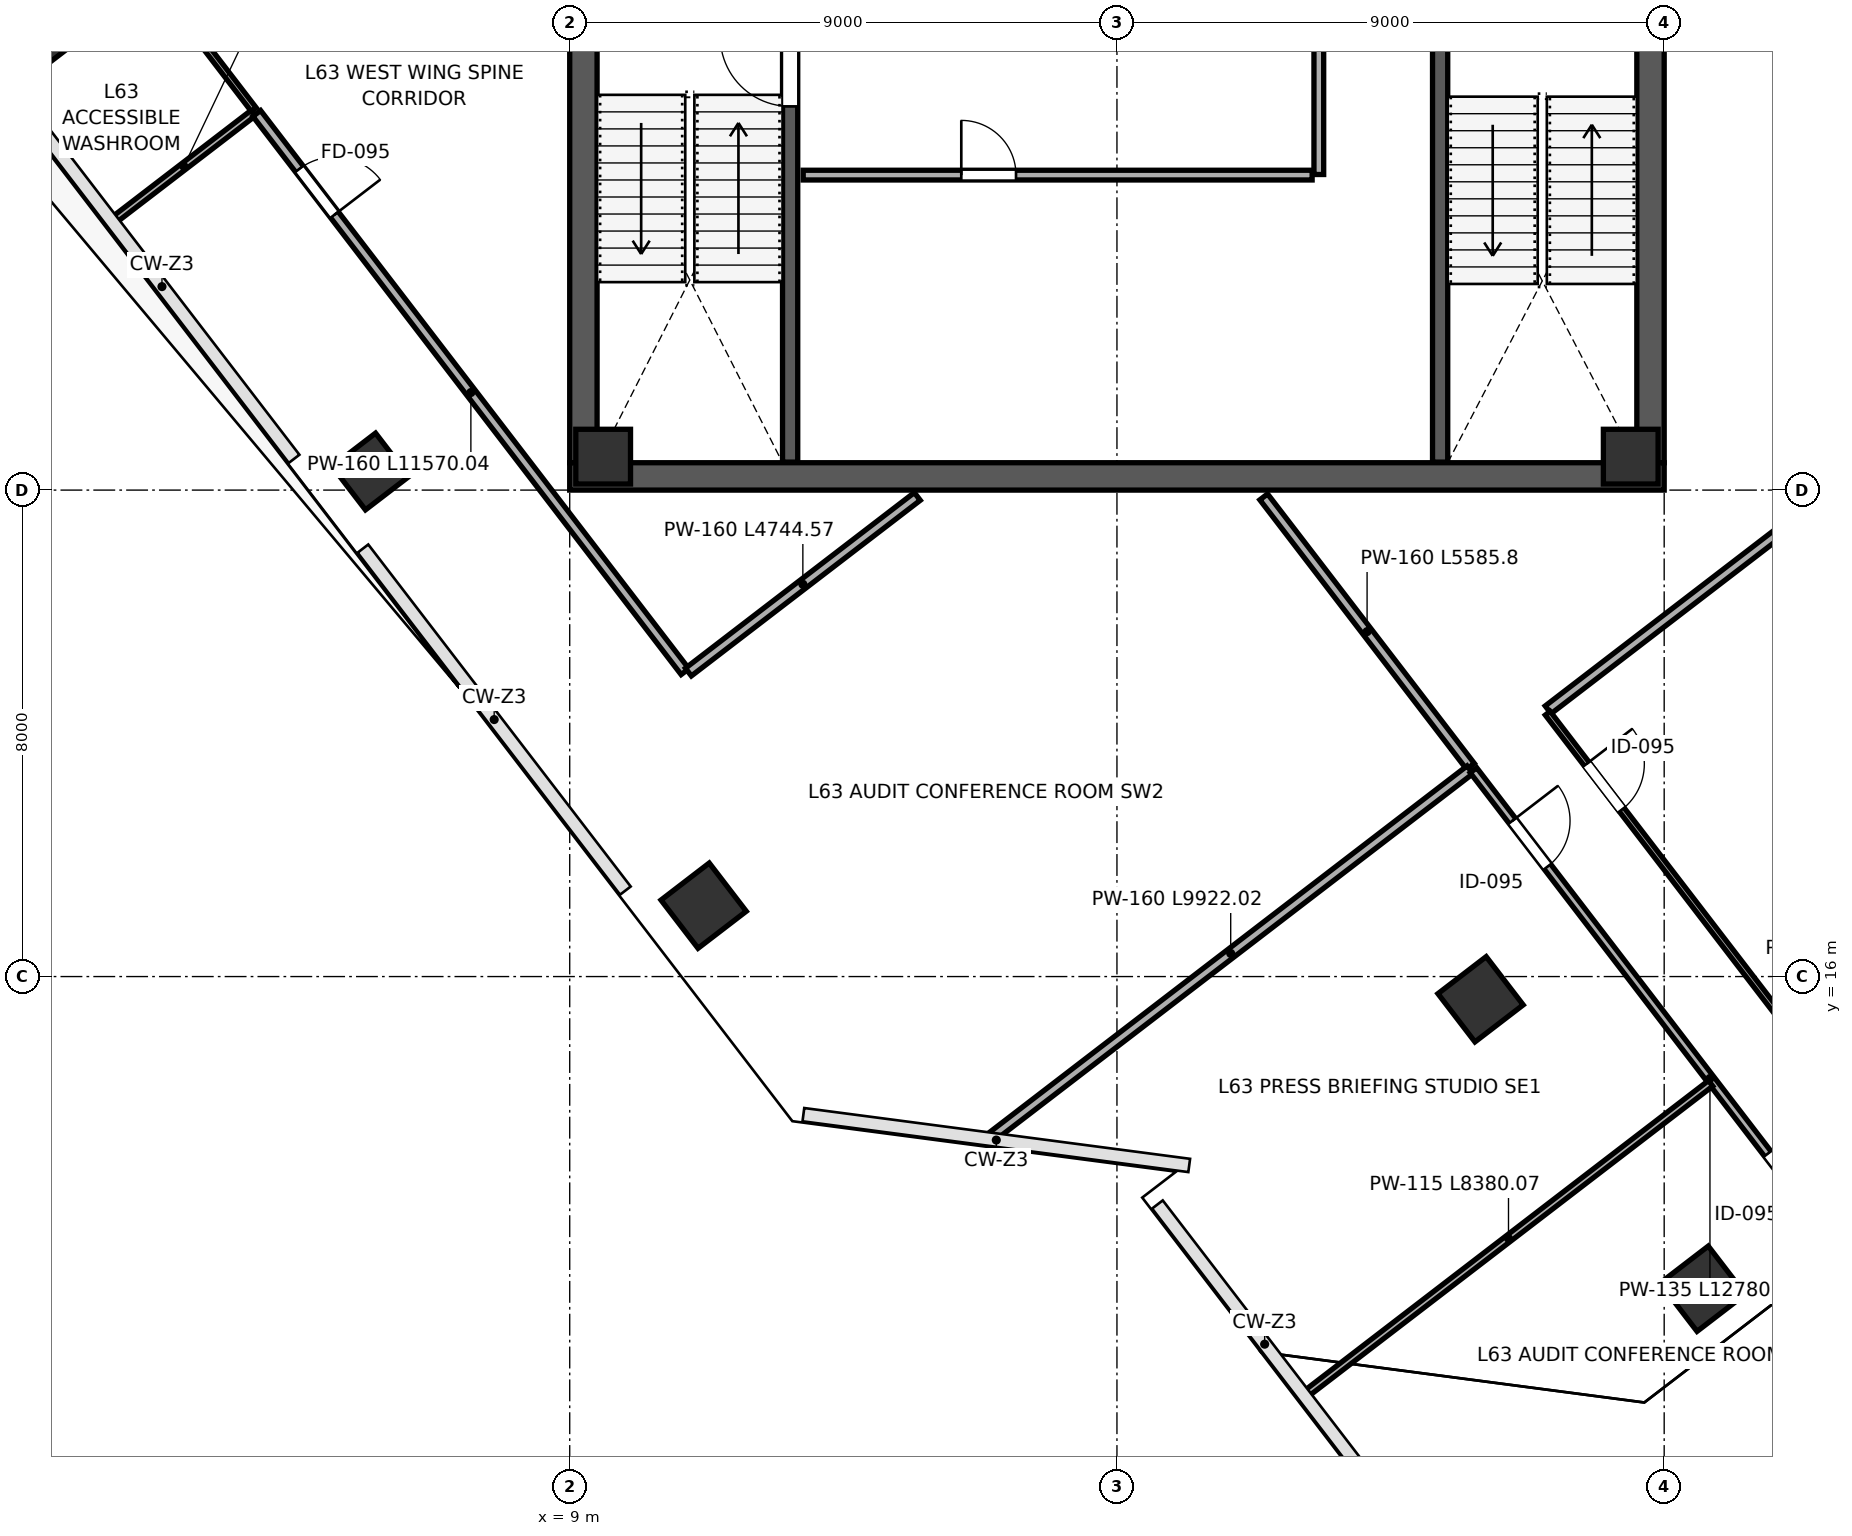
"""IFC4 building model, lengths in metres.
Left out: names, types, materials, properties, quantities, classifications, styles, units other than length and angle.
Written with IfcOpenShell. Run it as: python <this file> out.ifc"""

import sys

from ifc_helpers import new_model, si_unit, direction, frame, frame_2d, origin, origin_2d, place, context, subcontext, project, spatial, rectangle, extrude, source, transform, mapped, element, fill, save


model = new_model("IFC4")
c1 = context("Model", 3, precision=1e-05, world=origin(), true_north=direction((0.0, 1.0)))
c2 = subcontext(c1, "Body", "Model", "MODEL_VIEW")
j1 = project(units=[si_unit("LENGTHUNIT", "METRE"), si_unit("PLANEANGLEUNIT", "RADIAN")], contexts=[c1])
p1 = place(None, origin())
s1 = spatial("IfcSite", under=j1, at=p1, CompositionType="ELEMENT")
p2 = place(p1, origin())
s2 = spatial("IfcBuilding", under=s1, at=p2, CompositionType="ELEMENT")
p3 = place(p2, frame((0.0, 0.0, 279.4)))
s3 = spatial("IfcBuildingStorey", under=s2, at=p3, CompositionType="ELEMENT", Elevation=279.4)
m1 = source(origin(), c2, "Body", "SweptSolid", [
    extrude(rectangle(XDim=0.9, YDim=0.9, at=origin_2d()), origin(), (0.0, 0.0, 1.0), 4.199),
])
for number, where, z_axis, x_axis in (
    (1, (9.55, 24.55, 0.001), (0.0, 0.0, 1.0), (1.0, 0.0, 0.0)),
    (2, (26.45, 24.55, 0.001), (0.0, 0.0, 1.0), (1.0, 0.0, 0.0)),
):
    element("IfcColumn", number, at=place(p3, frame(where, z_axis=z_axis, x_axis=x_axis)), inside=s3, PredefinedType="COLUMN", context=c2, shape_type="MappedRepresentation", body=[
        mapped(m1, transform((0.0, 0.0, 0.0), scale=1.0)),
    ])
m2 = source(origin(), c2, "Body", "SweptSolid", [
    extrude(rectangle(XDim=0.9, YDim=0.9, at=origin_2d()), origin(), (0.0, 0.0, 1.0), 4.199),
])
for number, where, z_axis, x_axis in (
    (3, (0.245, 31.446, 0.001), (0.0, 0.0, 1.0), (-0.609, 0.793, 0.0)),
    (4, (5.724, 24.306, 0.001), (0.0, 0.0, 1.0), (-0.609, 0.793, 0.0)),
):
    element("IfcColumn", number, at=place(p3, frame(where, z_axis=z_axis, x_axis=x_axis)), inside=s3, PredefinedType="COLUMN", context=c2, shape_type="MappedRepresentation", body=[
        mapped(m2, transform((0.0, 0.0, 0.0), scale=1.0)),
    ])
m3 = source(origin(), c2, "Body", "SweptSolid", [
    extrude(rectangle(XDim=1.0, YDim=1.0, at=origin_2d()), origin(), (0.0, 0.0, 1.0), 4.199),
])
p4 = place(p3, frame((11.202, 17.166, 0.001), z_axis=(0.0, 0.0, 1.0), x_axis=(-0.608761429009, 0.793353340291, 0.0)))
e5 = element("IfcColumn", 5, at=p4, inside=s3, PredefinedType="COLUMN", context=c2, shape_type="MappedRepresentation", body=[
    mapped(m3, transform((0.0, 0.0, 0.0), scale=1.0)),
])
m4 = source(origin(), c2, "Body", "SweptSolid", [
    extrude(rectangle(XDim=1.0, YDim=1.0, at=origin_2d()), origin(), (0.0, 0.0, 1.0), 4.199),
])
p5 = place(p3, frame((23.98, 15.626, 0.001), z_axis=(0.0, 0.0, 1.0), x_axis=(-0.608761429009, 0.793353340291, 0.0)))
e6 = element("IfcColumn", 6, at=p5, inside=s3, PredefinedType="COLUMN", context=c2, shape_type="MappedRepresentation", body=[
    mapped(m4, transform((0.0, 0.0, 0.0), scale=1.0)),
])
p6 = place(p3, frame((27.633, 10.866, 0.001), z_axis=(0.0, 0.0, 1.0), x_axis=(-0.608761429009, 0.793353340291, 0.0)))
e7 = element("IfcColumn", 7, at=p6, inside=s3, PredefinedType="COLUMN", context=c2, shape_type="MappedRepresentation", body=[
    mapped(m3, transform((0.0, 0.0, 0.0), scale=1.0)),
])
p7 = place(p3, frame((9.225, 24.45, 0.0), z_axis=(0.0, 0.0, 1.0), x_axis=(0.0, 1.0, 0.0)))
e8 = element("IfcWall", 8, at=p7, inside=s3, PredefinedType="SHEAR", context=c2, shape_type="SweptSolid", body=[
    extrude(rectangle(XDim=15.1, YDim=0.45, at=frame_2d((7.55, 0.0))), origin(), (0.0, 0.0, 1.0), 3.96),
])
p8 = place(p7, frame((8.7, 0.0, 0.0)))
e9 = element("IfcOpeningElement", 9, at=p8, cuts=e8, PredefinedType="OPENING", context=c2, shape_type="SweptSolid", body=[
    extrude(rectangle(XDim=1.15, YDim=2.2, at=frame_2d((0.575, 1.1))), frame((0.0, 0.235, 0.0), z_axis=(0.0, -1.0, 0.0), x_axis=(1.0, 0.0, 0.0)), (0.0, 0.0, 1.0), 0.47),
])
p9 = place(p3, frame((26.775, 24.45, 0.0), z_axis=(0.0, 0.0, 1.0), x_axis=(0.0, 1.0, 0.0)))
e10 = element("IfcWall", 10, at=p9, inside=s3, PredefinedType="SHEAR", context=c2, shape_type="SweptSolid", body=[
    extrude(rectangle(XDim=15.1, YDim=0.45, at=frame_2d((7.55, 0.0))), origin(), (0.0, 0.0, 1.0), 3.96),
])
p10 = place(p9, frame((8.6, 0.0, 0.0)))
e11 = element("IfcOpeningElement", 11, at=p10, cuts=e10, PredefinedType="OPENING", context=c2, shape_type="SweptSolid", body=[
    extrude(rectangle(XDim=1.15, YDim=2.2, at=frame_2d((0.575, 1.1))), frame((0.0, 0.235, 0.0), z_axis=(0.0, -1.0, 0.0), x_axis=(1.0, 0.0, 0.0)), (0.0, 0.0, 1.0), 0.47),
])
p11 = place(p3, frame((9.0, 24.225, 0.0), z_axis=(0.0, 0.0, 1.0), x_axis=(1.0, 0.0, 0.0)))
e12 = element("IfcWall", 12, at=p11, inside=s3, PredefinedType="SHEAR", context=c2, shape_type="SweptSolid", body=[
    extrude(rectangle(XDim=18.0, YDim=0.45, at=frame_2d((9.0, 0.0))), origin(), (0.0, 0.0, 1.0), 3.96),
])
p12 = place(p3, frame((12.625, 24.46, 0.0), z_axis=(0.0, 0.0, 1.0), x_axis=(0.0, 1.0, 0.0)))
e13 = element("IfcWall", 13, at=p12, inside=s3, PredefinedType="SHEAR", context=c2, shape_type="SweptSolid", body=[
    extrude(rectangle(XDim=7.49, YDim=0.25, at=frame_2d((3.745, 0.0))), origin(), (0.0, 0.0, 1.0), 3.96),
])
p13 = place(p12, frame((5.85, 0.0, 0.0)))
e14 = element("IfcOpeningElement", 14, at=p13, cuts=e13, PredefinedType="OPENING", context=c2, shape_type="SweptSolid", body=[
    extrude(rectangle(XDim=1.15, YDim=2.2, at=frame_2d((0.575, 1.1))), frame((0.0, 0.135, 0.0), z_axis=(0.0, -1.0, 0.0), x_axis=(1.0, 0.0, 0.0)), (0.0, 0.0, 1.0), 0.27),
])
p14 = place(p3, frame((23.315, 24.46, 0.0), z_axis=(0.0, 0.0, 1.0), x_axis=(0.0, 1.0, 0.0)))
e15 = element("IfcWall", 15, at=p14, inside=s3, PredefinedType="SHEAR", context=c2, shape_type="SweptSolid", body=[
    extrude(rectangle(XDim=7.49, YDim=0.25, at=frame_2d((3.745, 0.0))), origin(), (0.0, 0.0, 1.0), 3.96),
])
p15 = place(p3, frame((12.84, 29.18, 0.0), z_axis=(0.0, 0.0, 1.0), x_axis=(1.0, 0.0, 0.0)))
e16 = element("IfcWall", 16, at=p15, inside=s3, PredefinedType="PARTITIONING", context=c2, shape_type="SweptSolid", body=[
    extrude(rectangle(XDim=8.37, YDim=0.16, at=frame_2d((4.185, 0.0))), origin(), (0.0, 0.0, 1.0), 3.96),
])
p16 = place(p15, frame((2.6, 0.0, 0.0)))
e17 = element("IfcOpeningElement", 17, at=p16, cuts=e16, PredefinedType="OPENING", context=c2, shape_type="SweptSolid", body=[
    extrude(rectangle(XDim=0.9, YDim=2.15, at=frame_2d((0.45, 1.075))), frame((0.0, 0.09, 0.0), z_axis=(0.0, -1.0, 0.0), x_axis=(1.0, 0.0, 0.0)), (0.0, 0.0, 1.0), 0.18),
])
p17 = place(p3, frame((21.32, 29.19, 0.0), z_axis=(0.0, 0.0, 1.0), x_axis=(0.0, 1.0, 0.0)))
e18 = element("IfcWall", 18, at=p17, inside=s3, PredefinedType="PARTITIONING", context=c2, shape_type="SweptSolid", body=[
    extrude(rectangle(XDim=2.92, YDim=0.16, at=frame_2d((1.46, 0.0))), origin(), (0.0, 0.0, 1.0), 3.96),
])
p18 = place(p3, frame((-0.406, 30.947, 0.0), z_axis=(0.0, 0.0, 1.0), x_axis=(0.793370260172, 0.608739377956, 0.0)))
e19 = element("IfcWall", 19, at=p18, inside=s3, PredefinedType="PARTITIONING", context=c2, shape_type="SweptSolid", body=[
    extrude(rectangle(XDim=2.88, YDim=0.135, at=frame_2d((1.44, 0.0))), origin(), (0.0, 0.0, 1.0), 3.195),
])
p19 = place(p3, frame((1.512, 28.448, 0.0), z_axis=(0.0, 0.0, 1.0), x_axis=(0.793370260172, 0.608739377956, 0.0)))
e20 = element("IfcWall", 20, at=p19, inside=s3, PredefinedType="PARTITIONING", context=c2, shape_type="SweptSolid", body=[
    extrude(rectangle(XDim=2.88, YDim=0.115, at=frame_2d((1.44, 0.0))), origin(), (0.0, 0.0, 1.0), 3.195),
])
p20 = place(p3, frame((-0.258, 35.551, 0.0), z_axis=(0.0, 0.0, 1.0), x_axis=(0.608751837986, -0.79336069965, 0.0)))
e21 = element("IfcWall", 21, at=p20, inside=s3, PredefinedType="PARTITIONING", context=c2, shape_type="SweptSolid", body=[
    extrude(rectangle(XDim=6.672, YDim=0.1, at=frame_2d((3.336, 0.0))), origin(), (0.0, 0.0, 1.0), 3.96),
])
p21 = place(p20, frame((2.15, 0.0, 0.0)))
e22 = element("IfcOpeningElement", 22, at=p21, cuts=e21, PredefinedType="OPENING", context=c2, shape_type="SweptSolid", body=[
    extrude(rectangle(XDim=0.9, YDim=2.15, at=frame_2d((0.45, 1.075))), frame((0.0, 0.06, 0.0), z_axis=(0.0, -1.0, 0.0), x_axis=(1.0, 0.0, 0.0)), (0.0, 0.0, 1.0), 0.12),
])
p22 = place(p20, frame((4.25, 0.0, 0.0)))
e23 = element("IfcOpeningElement", 23, at=p22, cuts=e21, PredefinedType="OPENING", context=c2, shape_type="SweptSolid", body=[
    extrude(rectangle(XDim=0.95, YDim=2.15, at=frame_2d((0.475, 1.075))), frame((0.0, 0.06, 0.0), z_axis=(0.0, -1.0, 0.0), x_axis=(1.0, 0.0, 0.0)), (0.0, 0.0, 1.0), 0.12),
])
p23 = place(p3, frame((3.853, 30.194, 0.0), z_axis=(0.0, 0.0, 1.0), x_axis=(0.608748677634, -0.793363124603, 0.0)))
e24 = element("IfcWall", 24, at=p23, inside=s3, PredefinedType="PARTITIONING", context=c2, shape_type="SweptSolid", body=[
    extrude(rectangle(XDim=11.57, YDim=0.16, at=frame_2d((5.785, 0.0))), origin(), (0.0, 0.0, 1.0), 3.96),
])
p24 = place(p23, frame((1.15, 0.0, 0.0)))
e25 = element("IfcOpeningElement", 25, at=p24, cuts=e24, PredefinedType="OPENING", context=c2, shape_type="SweptSolid", body=[
    extrude(rectangle(XDim=0.95, YDim=2.15, at=frame_2d((0.475, 1.075))), frame((0.0, 0.09, 0.0), z_axis=(0.0, -1.0, 0.0), x_axis=(1.0, 0.0, 0.0)), (0.0, 0.0, 1.0), 0.18),
])
p25 = place(p3, frame((10.952, 21.007, 0.0), z_axis=(0.0, 0.0, 1.0), x_axis=(0.793369431695, 0.608740457709, 0.0)))
e26 = element("IfcWall", 26, at=p25, inside=s3, PredefinedType="PARTITIONING", context=c2, shape_type="SweptSolid", body=[
    extrude(rectangle(XDim=4.745, YDim=0.16, at=frame_2d((2.372, 0.0))), origin(), (0.0, 0.0, 1.0), 3.96),
])
p26 = place(p3, frame((20.414, 23.888, 0.0), z_axis=(0.0, 0.0, 1.0), x_axis=(0.608740736079, -0.793369218106, 0.0)))
e27 = element("IfcWall", 27, at=p26, inside=s3, PredefinedType="PARTITIONING", context=c2, shape_type="SweptSolid", body=[
    extrude(rectangle(XDim=5.585, YDim=0.16, at=frame_2d((2.793, 0.0))), origin(), (0.0, 0.0, 1.0), 3.96),
])
p27 = place(p3, frame((20.518, 50.922, 0.0), z_axis=(0.0, 0.0, 1.0), x_axis=(0.608759693778, -0.793354671778, 0.0)))
e28 = element("IfcWall", 28, at=p27, inside=s3, PredefinedType="PARTITIONING", context=c2, shape_type="SweptSolid", body=[
    extrude(rectangle(XDim=26.97, YDim=0.135, at=frame_2d((13.485, 0.0))), origin(), (0.0, 0.0, 1.0), 3.96),
])
p28 = place(p27, frame((5.4, 0.0, 0.0)))
e29 = element("IfcOpeningElement", 29, at=p28, cuts=e28, PredefinedType="OPENING", context=c2, shape_type="SweptSolid", body=[
    extrude(rectangle(XDim=0.95, YDim=2.15, at=frame_2d((0.475, 1.075))), frame((0.0, 0.078, 0.0), z_axis=(0.0, -1.0, 0.0), x_axis=(1.0, 0.0, 0.0)), (0.0, 0.0, 1.0), 0.155),
])
p29 = place(p3, frame((25.092, 20.387, 0.0), z_axis=(0.0, 0.0, 1.0), x_axis=(0.793357014217, 0.608756641025, 0.0)))
e30 = element("IfcWall", 30, at=p29, inside=s3, PredefinedType="PARTITIONING", context=c2, shape_type="SweptSolid", body=[
    extrude(rectangle(XDim=20.24, YDim=0.16, at=frame_2d((10.12, 0.0))), origin(), (0.0, 0.0, 1.0), 3.195),
])
p30 = place(p3, frame((15.935, 13.361, 0.0), z_axis=(0.0, 0.0, 1.0), x_axis=(0.793355203048, 0.608759001409, 0.0)))
e31 = element("IfcWall", 31, at=p30, inside=s3, PredefinedType="PARTITIONING", context=c2, shape_type="SweptSolid", body=[
    extrude(rectangle(XDim=9.922, YDim=0.16, at=frame_2d((4.961, 0.0))), origin(), (0.0, 0.0, 1.0), 3.96),
])
p31 = place(p3, frame((25.085, 20.331, 0.0), z_axis=(0.0, 0.0, 1.0), x_axis=(0.608748325205, -0.793363395022, 0.0)))
e32 = element("IfcWall", 32, at=p31, inside=s3, PredefinedType="PARTITIONING", context=c2, shape_type="SweptSolid", body=[
    extrude(rectangle(XDim=12.78, YDim=0.1, at=frame_2d((6.39, 0.0))), origin(), (0.0, 0.0, 1.0), 3.253),
])
p32 = place(p31, frame((1.05, 0.0, 0.0)))
e33 = element("IfcOpeningElement", 33, at=p32, cuts=e32, PredefinedType="OPENING", context=c2, shape_type="SweptSolid", body=[
    extrude(rectangle(XDim=0.95, YDim=2.15, at=frame_2d((0.475, 1.075))), frame((0.0, 0.06, 0.0), z_axis=(0.0, -1.0, 0.0), x_axis=(1.0, 0.0, 0.0)), (0.0, 0.0, 1.0), 0.12),
])
p33 = place(p3, frame((23.863, 19.393, 0.0), z_axis=(0.0, 0.0, 1.0), x_axis=(0.608748325205, -0.793363395022, 0.0)))
e34 = element("IfcWall", 34, at=p33, inside=s3, PredefinedType="PARTITIONING", context=c2, shape_type="SweptSolid", body=[
    extrude(rectangle(XDim=12.78, YDim=0.135, at=frame_2d((6.39, 0.0))), origin(), (0.0, 0.0, 1.0), 3.253),
])
p34 = place(p33, frame((1.05, 0.0, 0.0)))
e35 = element("IfcOpeningElement", 35, at=p34, cuts=e34, PredefinedType="OPENING", context=c2, shape_type="SweptSolid", body=[
    extrude(rectangle(XDim=0.95, YDim=2.15, at=frame_2d((0.475, 1.075))), frame((0.0, 0.078, 0.0), z_axis=(0.0, -1.0, 0.0), x_axis=(1.0, 0.0, 0.0)), (0.0, 0.0, 1.0), 0.155),
])
p35 = place(p33, frame((7.95, 0.0, 0.0)))
e36 = element("IfcOpeningElement", 36, at=p35, cuts=e34, PredefinedType="OPENING", context=c2, shape_type="SweptSolid", body=[
    extrude(rectangle(XDim=0.95, YDim=2.15, at=frame_2d((0.475, 1.075))), frame((0.0, 0.078, 0.0), z_axis=(0.0, -1.0, 0.0), x_axis=(1.0, 0.0, 0.0)), (0.0, 0.0, 1.0), 0.155),
])
p36 = place(p3, frame((21.115, 9.142, 0.0), z_axis=(0.0, 0.0, 1.0), x_axis=(0.793351209169, 0.608764206331, 0.0)))
e37 = element("IfcWall", 37, at=p36, inside=s3, PredefinedType="PARTITIONING", context=c2, shape_type="SweptSolid", body=[
    extrude(rectangle(XDim=8.38, YDim=0.115, at=frame_2d((4.19, 0.0))), origin(), (0.0, 0.0, 1.0), 3.96),
])
m5 = source(origin(), c2, "Body", "SweptSolid", [
    extrude(rectangle(XDim=1.15, YDim=2.2, at=frame_2d((0.575, 1.1))), frame((0.0, 0.025, 0.0), z_axis=(0.0, -1.0, 0.0), x_axis=(1.0, 0.0, 0.0)), (0.0, 0.0, 1.0), 0.05),
])
p37 = place(p13, origin())
e38 = element("IfcDoor", 38, at=p37, inside=s3, OperationType="SINGLE_SWING_RIGHT", PredefinedType="DOOR", context=c2, shape_type="MappedRepresentation", body=[
    mapped(m5, transform((0.0, 0.0, 0.0), scale=1.0)),
])
fill(e14, e38)
m6 = source(origin(), c2, "Body", "SweptSolid", [
    extrude(rectangle(XDim=0.9, YDim=2.15, at=frame_2d((0.45, 1.075))), frame((0.0, 0.025, 0.0), z_axis=(0.0, -1.0, 0.0), x_axis=(1.0, 0.0, 0.0)), (0.0, 0.0, 1.0), 0.05),
])
p38 = place(p16, origin())
e39 = element("IfcDoor", 39, at=p38, inside=s3, OperationType="SINGLE_SWING_LEFT", PredefinedType="DOOR", context=c2, shape_type="MappedRepresentation", body=[
    mapped(m6, transform((0.0, 0.0, 0.0), scale=1.0)),
])
fill(e17, e39)
m7 = source(origin(), c2, "Body", "SweptSolid", [
    extrude(rectangle(XDim=0.95, YDim=2.15, at=frame_2d((0.475, 1.075))), frame((0.0, 0.025, 0.0), z_axis=(0.0, -1.0, 0.0), x_axis=(1.0, 0.0, 0.0)), (0.0, 0.0, 1.0), 0.05),
])
p39 = place(p24, origin())
e40 = element("IfcDoor", 40, at=p39, inside=s3, OperationType="SINGLE_SWING_RIGHT", PredefinedType="DOOR", context=c2, shape_type="MappedRepresentation", body=[
    mapped(m7, transform((0.0, 0.0, 0.0), scale=1.0)),
])
fill(e25, e40)
m8 = source(origin(), c2, "Body", "SweptSolid", [
    extrude(rectangle(XDim=0.95, YDim=2.15, at=frame_2d((0.475, 1.075))), frame((0.0, 0.025, 0.0), z_axis=(0.0, -1.0, 0.0), x_axis=(1.0, 0.0, 0.0)), (0.0, 0.0, 1.0), 0.05),
])
p40 = place(p32, origin())
e41 = element("IfcDoor", 41, at=p40, inside=s3, OperationType="SINGLE_SWING_LEFT", PredefinedType="DOOR", context=c2, shape_type="MappedRepresentation", body=[
    mapped(m8, transform((0.0, 0.0, 0.0), scale=1.0)),
])
fill(e33, e41)
p41 = place(p34, origin())
e42 = element("IfcDoor", 42, at=p41, inside=s3, OperationType="SINGLE_SWING_LEFT", PredefinedType="DOOR", context=c2, shape_type="MappedRepresentation", body=[
    mapped(m8, transform((0.0, 0.0, 0.0), scale=1.0)),
])
fill(e35, e42)
p42 = place(p35, origin())
e43 = element("IfcDoor", 43, at=p42, inside=s3, OperationType="SINGLE_SWING_RIGHT", PredefinedType="DOOR", context=c2, shape_type="MappedRepresentation", body=[
    mapped(m8, transform((0.0, 0.0, 0.0), scale=1.0)),
])
fill(e36, e43)
save(model, sys.argv[1])
